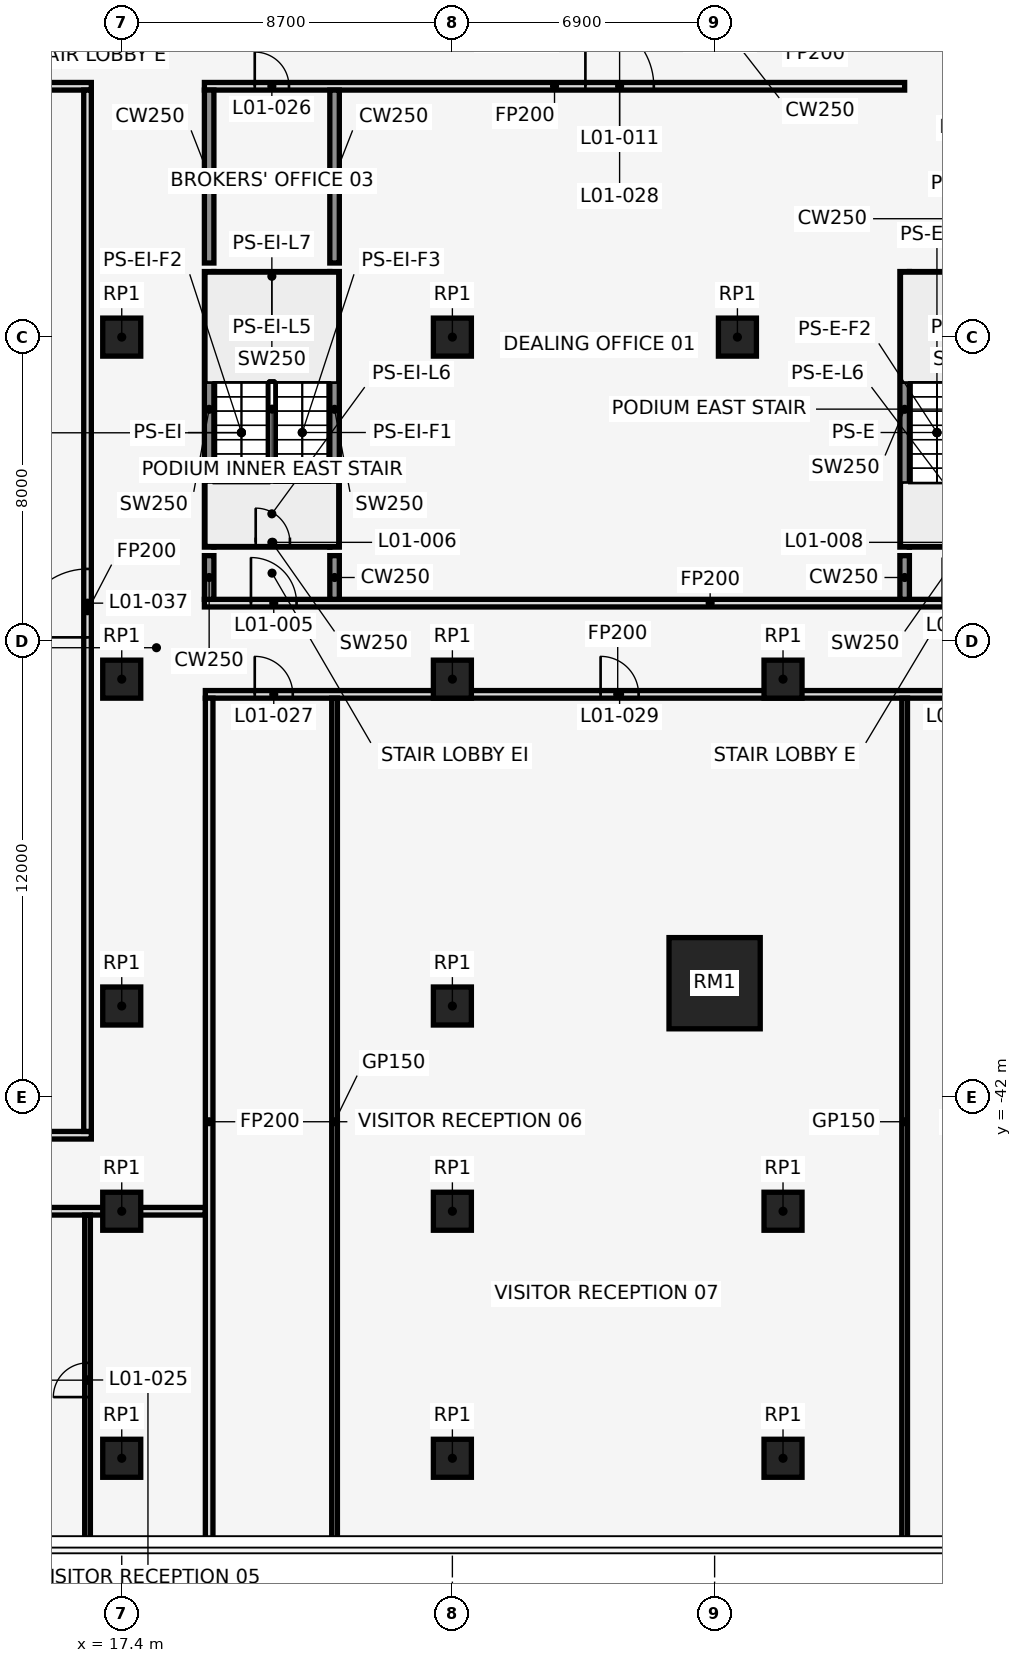
"""IFC4 building model, lengths in metres.
Left out: names, types, materials, properties, quantities, classifications, styles, units other than length and angle.
Written with IfcOpenShell. Run it as: python <this file> out.ifc"""

import sys

from ifc_helpers import new_model, si_unit, direction, frame, frame_2d, origin, origin_2d, place, context, subcontext, project, spatial, rectangle, extrude, element, fill, save


model = new_model("IFC4")
c1 = context("Model", 3, precision=1e-05, world=origin(), true_north=direction((0.0, 1.0)))
c2 = subcontext(c1, "Body", "Model", "MODEL_VIEW")
j1 = project(units=[si_unit("LENGTHUNIT", "METRE"), si_unit("PLANEANGLEUNIT", "RADIAN")], contexts=[c1])
p1 = place(None, origin())
s1 = spatial("IfcSite", under=j1, at=p1, CompositionType="ELEMENT")
p2 = place(p1, origin())
s2 = spatial("IfcBuilding", under=s1, at=p2, CompositionType="ELEMENT")
p3 = place(p2, frame((0.0, 0.0, 8.0)))
s3 = spatial("IfcBuildingStorey", under=s2, at=p3, CompositionType="ELEMENT", Elevation=8.0)
for number, where, z_axis, x_axis in (
    (1, (17.4, -39.6, 0.0), (0.0, 0.0, 1.0), (1.0, 0.0, 0.0)),
    (2, (26.1, -39.6, 0.0), (0.0, 0.0, 1.0), (1.0, 0.0, 0.0)),
):
    element("IfcColumn", number, at=place(p3, frame(where, z_axis=z_axis, x_axis=x_axis)), inside=s3, PredefinedType="COLUMN", context=c2, shape_type="SweptSolid", body=[
        extrude(rectangle(XDim=1.0, YDim=1.0, at=origin_2d()), origin(), (0.0, 0.0, 1.0), 6.0),
    ])
p4 = place(p3, frame((33.0, -39.0, 0.0), z_axis=(0.0, 0.0, 1.0), x_axis=(1.0, 0.0, 0.0)))
e3 = element("IfcColumn", 3, at=p4, inside=s3, PredefinedType="COLUMN", context=c2, shape_type="SweptSolid", body=[
    extrude(rectangle(XDim=2.4, YDim=2.4, at=origin_2d()), origin(), (0.0, 0.0, 1.0), 6.0),
])
for number, where, z_axis, x_axis in (
    (4, (33.6, -22.0, 0.0), (0.0, 0.0, 1.0), (1.0, 0.0, 0.0)),
    (5, (17.4, -22.0, 0.0), (0.0, 0.0, 1.0), (1.0, 0.0, 0.0)),
    (6, (26.1, -22.0, 0.0), (0.0, 0.0, 1.0), (1.0, 0.0, 0.0)),
    (7, (17.4, -31.0, 0.0), (0.0, 0.0, 1.0), (1.0, 0.0, 0.0)),
    (8, (17.4, -45.0, 0.0), (0.0, 0.0, 1.0), (1.0, 0.0, 0.0)),
    (9, (17.4, -51.5, 0.0), (0.0, 0.0, 1.0), (1.0, 0.0, 0.0)),
    (10, (26.1, -31.0, 0.0), (0.0, 0.0, 1.0), (1.0, 0.0, 0.0)),
    (11, (26.1, -45.0, 0.0), (0.0, 0.0, 1.0), (1.0, 0.0, 0.0)),
    (12, (26.1, -51.5, 0.0), (0.0, 0.0, 1.0), (1.0, 0.0, 0.0)),
    (13, (34.8, -31.0, 0.0), (0.0, 0.0, 1.0), (1.0, 0.0, 0.0)),
    (14, (34.8, -45.0, 0.0), (0.0, 0.0, 1.0), (1.0, 0.0, 0.0)),
    (15, (34.8, -51.5, 0.0), (0.0, 0.0, 1.0), (1.0, 0.0, 0.0)),
):
    element("IfcColumn", number, at=place(p3, frame(where, z_axis=z_axis, x_axis=x_axis)), inside=s3, PredefinedType="COLUMN", context=c2, shape_type="SweptSolid", body=[
        extrude(rectangle(XDim=1.0, YDim=1.0, at=origin_2d()), origin(), (0.0, 0.0, 1.0), 6.0),
    ])
for number, where, z_axis, x_axis in (
    (16, (19.7, -27.525, 0.0), (0.0, 0.0, 1.0), (0.0, 1.0, 0.0)),
    (17, (23.0, -27.525, 0.0), (0.0, 0.0, 1.0), (0.0, 1.0, 0.0)),
):
    element("IfcWall", number, at=place(p3, frame(where, z_axis=z_axis, x_axis=x_axis)), inside=s3, PredefinedType="SHEAR", context=c2, shape_type="SweptSolid", body=[
        extrude(rectangle(XDim=7.25, YDim=0.25, at=frame_2d((3.625, 0.0))), origin(), (0.0, 0.0, 1.0), 6.0),
    ])
p5 = place(p3, frame((19.825, -27.4, 0.0), z_axis=(0.0, 0.0, 1.0), x_axis=(1.0, 0.0, 0.0)))
e18 = element("IfcWall", 18, at=p5, inside=s3, PredefinedType="SHEAR", context=c2, shape_type="SweptSolid", body=[
    extrude(rectangle(XDim=3.05, YDim=0.25, at=frame_2d((1.525, 0.0))), origin(), (0.0, 0.0, 1.0), 6.0),
])
p6 = place(p5, frame((1.1, 0.0, 0.0)))
e19 = element("IfcOpeningElement", 19, at=p6, cuts=e18, PredefinedType="OPENING", context=c2, shape_type="SweptSolid", body=[
    extrude(rectangle(XDim=0.9, YDim=2.1, at=frame_2d((0.45, 1.05))), frame((0.0, 0.137, 0.0), z_axis=(0.0, -1.0, 0.0), x_axis=(1.0, 0.0, 0.0)), (0.0, 0.0, 1.0), 0.274),
])
p7 = place(p3, frame((19.825, -20.4, 0.0), z_axis=(0.0, 0.0, 1.0), x_axis=(1.0, 0.0, 0.0)))
e20 = element("IfcWall", 20, at=p7, inside=s3, PredefinedType="SHEAR", context=c2, shape_type="SweptSolid", body=[
    extrude(rectangle(XDim=3.05, YDim=0.25, at=frame_2d((1.525, 0.0))), origin(), (0.0, 0.0, 1.0), 6.0),
])
p8 = place(p3, frame((38.0, -27.525, 0.0), z_axis=(0.0, 0.0, 1.0), x_axis=(0.0, 1.0, 0.0)))
e21 = element("IfcWall", 21, at=p8, inside=s3, PredefinedType="SHEAR", context=c2, shape_type="SweptSolid", body=[
    extrude(rectangle(XDim=7.25, YDim=0.25, at=frame_2d((3.625, 0.0))), origin(), (0.0, 0.0, 1.0), 6.0),
])
p9 = place(p3, frame((38.125, -27.4, 0.0), z_axis=(0.0, 0.0, 1.0), x_axis=(1.0, 0.0, 0.0)))
e22 = element("IfcWall", 22, at=p9, inside=s3, PredefinedType="SHEAR", context=c2, shape_type="SweptSolid", body=[
    extrude(rectangle(XDim=3.05, YDim=0.25, at=frame_2d((1.525, 0.0))), origin(), (0.0, 0.0, 1.0), 6.0),
])
p10 = place(p9, frame((1.1, 0.0, 0.0)))
e23 = element("IfcOpeningElement", 23, at=p10, cuts=e22, PredefinedType="OPENING", context=c2, shape_type="SweptSolid", body=[
    extrude(rectangle(XDim=0.9, YDim=2.1, at=frame_2d((0.45, 1.05))), frame((0.0, 0.137, 0.0), z_axis=(0.0, -1.0, 0.0), x_axis=(1.0, 0.0, 0.0)), (0.0, 0.0, 1.0), 0.274),
])
p11 = place(p3, frame((38.125, -20.4, 0.0), z_axis=(0.0, 0.0, 1.0), x_axis=(1.0, 0.0, 0.0)))
e24 = element("IfcWall", 24, at=p11, inside=s3, PredefinedType="SHEAR", context=c2, shape_type="SweptSolid", body=[
    extrude(rectangle(XDim=3.05, YDim=0.25, at=frame_2d((1.525, 0.0))), origin(), (0.0, 0.0, 1.0), 6.0),
])
p12 = place(p3, frame((-16.5, -45.0, 0.0), z_axis=(0.0, 0.0, 1.0), x_axis=(1.0, 0.0, 0.0)))
e25 = element("IfcWall", 25, at=p12, inside=s3, PredefinedType="PARTITIONING", context=c2, shape_type="SweptSolid", body=[
    extrude(rectangle(XDim=36.1, YDim=0.2, at=frame_2d((18.05, 0.0))), origin(), (0.0, 0.0, 1.0), 5.7),
])
p13 = place(p12, frame((3.0, 0.0, 0.0)))
e26 = element("IfcOpeningElement", 26, at=p13, cuts=e25, PredefinedType="OPENING", context=c2, shape_type="SweptSolid", body=[
    extrude(rectangle(XDim=1.0, YDim=2.1, at=frame_2d((0.5, 1.05))), frame((0.0, 0.112, 0.0), z_axis=(0.0, -1.0, 0.0), x_axis=(1.0, 0.0, 0.0)), (0.0, 0.0, 1.0), 0.224),
])
p14 = place(p3, frame((-16.6, -43.0, 0.0), z_axis=(0.0, 0.0, 1.0), x_axis=(1.0, 0.0, 0.0)))
e27 = element("IfcWall", 27, at=p14, inside=s3, PredefinedType="PARTITIONING", context=c2, shape_type="SweptSolid", body=[
    extrude(rectangle(XDim=33.2, YDim=0.2, at=frame_2d((16.6, 0.0))), origin(), (0.0, 0.0, 1.0), 5.7),
])
p15 = place(p14, frame((16.5, 0.0, 0.0)))
e28 = element("IfcOpeningElement", 28, at=p15, cuts=e27, PredefinedType="OPENING", context=c2, shape_type="SweptSolid", body=[
    extrude(rectangle(XDim=1.8, YDim=2.1, at=frame_2d((0.9, 1.05))), frame((0.0, 0.112, 0.0), z_axis=(0.0, -1.0, 0.0), x_axis=(1.0, 0.0, 0.0)), (0.0, 0.0, 1.0), 0.224),
])
p16 = place(p3, frame((19.6, -31.4, 0.0), z_axis=(0.0, 0.0, 1.0), x_axis=(1.0, 0.0, 0.0)))
e29 = element("IfcWall", 29, at=p16, inside=s3, PredefinedType="PARTITIONING", context=c2, shape_type="SweptSolid", body=[
    extrude(rectangle(XDim=21.7, YDim=0.2, at=frame_2d((10.85, 0.0))), origin(), (0.0, 0.0, 1.0), 5.7),
])
p17 = place(p16, frame((1.3, 0.0, 0.0)))
e30 = element("IfcOpeningElement", 30, at=p17, cuts=e29, PredefinedType="OPENING", context=c2, shape_type="SweptSolid", body=[
    extrude(rectangle(XDim=1.0, YDim=2.1, at=frame_2d((0.5, 1.05))), frame((0.0, 0.112, 0.0), z_axis=(0.0, -1.0, 0.0), x_axis=(1.0, 0.0, 0.0)), (0.0, 0.0, 1.0), 0.224),
])
p18 = place(p16, frame((10.4, 0.0, 0.0)))
e31 = element("IfcOpeningElement", 31, at=p18, cuts=e29, PredefinedType="OPENING", context=c2, shape_type="SweptSolid", body=[
    extrude(rectangle(XDim=1.0, YDim=2.1, at=frame_2d((0.5, 1.05))), frame((0.0, 0.112, 0.0), z_axis=(0.0, -1.0, 0.0), x_axis=(1.0, 0.0, 0.0)), (0.0, 0.0, 1.0), 0.224),
])
p19 = place(p16, frame((19.5, 0.0, 0.0)))
e32 = element("IfcOpeningElement", 32, at=p19, cuts=e29, PredefinedType="OPENING", context=c2, shape_type="SweptSolid", body=[
    extrude(rectangle(XDim=1.0, YDim=2.1, at=frame_2d((0.5, 1.05))), frame((0.0, 0.112, 0.0), z_axis=(0.0, -1.0, 0.0), x_axis=(1.0, 0.0, 0.0)), (0.0, 0.0, 1.0), 0.224),
])
p20 = place(p3, frame((19.575, -29.0, 0.0), z_axis=(0.0, 0.0, 1.0), x_axis=(1.0, 0.0, 0.0)))
e33 = element("IfcWall", 33, at=p20, inside=s3, PredefinedType="PARTITIONING", context=c2, shape_type="SweptSolid", body=[
    extrude(rectangle(XDim=26.615, YDim=0.2, at=frame_2d((13.308, 0.0))), origin(), (0.0, 0.0, 1.0), 5.7),
])
p21 = place(p20, frame((1.225, 0.0, 0.0)))
e34 = element("IfcOpeningElement", 34, at=p21, cuts=e33, PredefinedType="OPENING", context=c2, shape_type="SweptSolid", body=[
    extrude(rectangle(XDim=1.2, YDim=2.1, at=frame_2d((0.6, 1.05))), frame((0.0, 0.112, 0.0), z_axis=(0.0, -1.0, 0.0), x_axis=(1.0, 0.0, 0.0)), (0.0, 0.0, 1.0), 0.224),
])
p22 = place(p20, frame((19.425, 0.0, 0.0)))
e35 = element("IfcOpeningElement", 35, at=p22, cuts=e33, PredefinedType="OPENING", context=c2, shape_type="SweptSolid", body=[
    extrude(rectangle(XDim=1.2, YDim=2.1, at=frame_2d((0.6, 1.05))), frame((0.0, 0.112, 0.0), z_axis=(0.0, -1.0, 0.0), x_axis=(1.0, 0.0, 0.0)), (0.0, 0.0, 1.0), 0.224),
])
p23 = place(p20, frame((23.725, 0.0, 0.0)))
e36 = element("IfcOpeningElement", 36, at=p23, cuts=e33, PredefinedType="OPENING", context=c2, shape_type="SweptSolid", body=[
    extrude(rectangle(XDim=0.9, YDim=2.1, at=frame_2d((0.45, 1.05))), frame((0.0, 0.112, 0.0), z_axis=(0.0, -1.0, 0.0), x_axis=(1.0, 0.0, 0.0)), (0.0, 0.0, 1.0), 0.224),
])
p24 = place(p3, frame((-16.6, -15.4, 0.0), z_axis=(0.0, 0.0, 1.0), x_axis=(1.0, 0.0, 0.0)))
e37 = element("IfcWall", 37, at=p24, inside=s3, PredefinedType="PARTITIONING", context=c2, shape_type="SweptSolid", body=[
    extrude(rectangle(XDim=33.2, YDim=0.2, at=frame_2d((16.6, 0.0))), origin(), (0.0, 0.0, 1.0), 5.7),
])
p25 = place(p24, frame((15.7, 0.0, 0.0)))
e38 = element("IfcOpeningElement", 38, at=p25, cuts=e37, PredefinedType="OPENING", context=c2, shape_type="SweptSolid", body=[
    extrude(rectangle(XDim=1.8, YDim=2.1, at=frame_2d((0.9, 1.05))), frame((0.0, 0.112, 0.0), z_axis=(0.0, -1.0, 0.0), x_axis=(1.0, 0.0, 0.0)), (0.0, 0.0, 1.0), 0.224),
])
p26 = place(p3, frame((19.575, -15.4, 0.0), z_axis=(0.0, 0.0, 1.0), x_axis=(1.0, 0.0, 0.0)))
e39 = element("IfcWall", 39, at=p26, inside=s3, PredefinedType="PARTITIONING", context=c2, shape_type="SweptSolid", body=[
    extrude(rectangle(XDim=18.425, YDim=0.2, at=frame_2d((9.212, 0.0))), origin(), (0.0, 0.0, 1.0), 5.7),
])
p27 = place(p26, frame((1.325, 0.0, 0.0)))
e40 = element("IfcOpeningElement", 40, at=p27, cuts=e39, PredefinedType="OPENING", context=c2, shape_type="SweptSolid", body=[
    extrude(rectangle(XDim=0.9, YDim=2.1, at=frame_2d((0.45, 1.05))), frame((0.0, 0.112, 0.0), z_axis=(0.0, -1.0, 0.0), x_axis=(1.0, 0.0, 0.0)), (0.0, 0.0, 1.0), 0.224),
])
p28 = place(p26, frame((10.025, 0.0, 0.0)))
e41 = element("IfcOpeningElement", 41, at=p28, cuts=e39, PredefinedType="OPENING", context=c2, shape_type="SweptSolid", body=[
    extrude(rectangle(XDim=1.8, YDim=2.1, at=frame_2d((0.9, 1.05))), frame((0.0, 0.112, 0.0), z_axis=(0.0, -1.0, 0.0), x_axis=(1.0, 0.0, 0.0)), (0.0, 0.0, 1.0), 0.224),
])
p29 = place(p3, frame((16.5, -53.79, 0.0), z_axis=(0.0, 0.0, 1.0), x_axis=(0.0, 1.0, 0.0)))
e42 = element("IfcWall", 42, at=p29, inside=s3, PredefinedType="PARTITIONING", context=c2, shape_type="SweptSolid", body=[
    extrude(rectangle(XDim=8.69, YDim=0.15, at=frame_2d((4.345, 0.0))), origin(), (0.0, 0.0, 1.0), 5.7),
])
p30 = place(p29, frame((3.9, 0.0, 0.0)))
e43 = element("IfcOpeningElement", 43, at=p30, cuts=e42, PredefinedType="OPENING", context=c2, shape_type="SweptSolid", body=[
    extrude(rectangle(XDim=0.9, YDim=2.1, at=frame_2d((0.45, 1.05))), frame((0.0, 0.087, 0.0), z_axis=(0.0, -1.0, 0.0), x_axis=(1.0, 0.0, 0.0)), (0.0, 0.0, 1.0), 0.174),
])
p31 = place(p3, frame((16.5, -42.9, 0.0), z_axis=(0.0, 0.0, 1.0), x_axis=(0.0, 1.0, 0.0)))
e44 = element("IfcWall", 44, at=p31, inside=s3, PredefinedType="PARTITIONING", context=c2, shape_type="SweptSolid", body=[
    extrude(rectangle(XDim=27.4, YDim=0.2, at=frame_2d((13.7, 0.0))), origin(), (0.0, 0.0, 1.0), 5.7),
])
p32 = place(p31, frame((13.0, 0.0, 0.0)))
e45 = element("IfcOpeningElement", 45, at=p32, cuts=e44, PredefinedType="OPENING", context=c2, shape_type="SweptSolid", body=[
    extrude(rectangle(XDim=1.8, YDim=2.1, at=frame_2d((0.9, 1.05))), frame((0.0, 0.112, 0.0), z_axis=(0.0, -1.0, 0.0), x_axis=(1.0, 0.0, 0.0)), (0.0, 0.0, 1.0), 0.224),
])
p33 = place(p3, frame((19.7, -53.79, 0.0), z_axis=(0.0, 0.0, 1.0), x_axis=(0.0, 1.0, 0.0)))
e46 = element("IfcWall", 46, at=p33, inside=s3, PredefinedType="PARTITIONING", context=c2, shape_type="SweptSolid", body=[
    extrude(rectangle(XDim=22.29, YDim=0.2, at=frame_2d((11.145, 0.0))), origin(), (0.0, 0.0, 1.0), 5.7),
])
p34 = place(p3, frame((19.7, -28.9, 0.0), z_axis=(0.0, 0.0, 1.0), x_axis=(0.0, 1.0, 0.0)))
e47 = element("IfcWall", 47, at=p34, inside=s3, PredefinedType="SHEAR", context=c2, shape_type="SweptSolid", body=[
    extrude(rectangle(XDim=1.15, YDim=0.25, at=frame_2d((0.575, 0.0))), origin(), (0.0, 0.0, 1.0), 6.0),
])
p35 = place(p3, frame((19.7, -20.05, 0.0), z_axis=(0.0, 0.0, 1.0), x_axis=(0.0, 1.0, 0.0)))
e48 = element("IfcWall", 48, at=p35, inside=s3, PredefinedType="SHEAR", context=c2, shape_type="SweptSolid", body=[
    extrude(rectangle(XDim=4.55, YDim=0.25, at=frame_2d((2.275, 0.0))), origin(), (0.0, 0.0, 1.0), 6.0),
])
p36 = place(p3, frame((23.0, -53.79, 0.0), z_axis=(0.0, 0.0, 1.0), x_axis=(0.0, 1.0, 0.0)))
e49 = element("IfcWall", 49, at=p36, inside=s3, PredefinedType="PARTITIONING", context=c2, shape_type="SweptSolid", body=[
    extrude(rectangle(XDim=22.29, YDim=0.15, at=frame_2d((11.145, 0.0))), origin(), (0.0, 0.0, 1.0), 5.7),
])
p37 = place(p3, frame((23.0, -28.9, 0.0), z_axis=(0.0, 0.0, 1.0), x_axis=(0.0, 1.0, 0.0)))
e50 = element("IfcWall", 50, at=p37, inside=s3, PredefinedType="SHEAR", context=c2, shape_type="SweptSolid", body=[
    extrude(rectangle(XDim=1.15, YDim=0.25, at=frame_2d((0.575, 0.0))), origin(), (0.0, 0.0, 1.0), 6.0),
])
p38 = place(p3, frame((23.0, -20.05, 0.0), z_axis=(0.0, 0.0, 1.0), x_axis=(0.0, 1.0, 0.0)))
e51 = element("IfcWall", 51, at=p38, inside=s3, PredefinedType="SHEAR", context=c2, shape_type="SweptSolid", body=[
    extrude(rectangle(XDim=4.55, YDim=0.25, at=frame_2d((2.275, 0.0))), origin(), (0.0, 0.0, 1.0), 6.0),
])
p39 = place(p3, frame((38.0, -53.79, 0.0), z_axis=(0.0, 0.0, 1.0), x_axis=(0.0, 1.0, 0.0)))
e52 = element("IfcWall", 52, at=p39, inside=s3, PredefinedType="PARTITIONING", context=c2, shape_type="SweptSolid", body=[
    extrude(rectangle(XDim=22.29, YDim=0.15, at=frame_2d((11.145, 0.0))), origin(), (0.0, 0.0, 1.0), 5.7),
])
p40 = place(p3, frame((38.0, -28.9, 0.0), z_axis=(0.0, 0.0, 1.0), x_axis=(0.0, 1.0, 0.0)))
e53 = element("IfcWall", 53, at=p40, inside=s3, PredefinedType="SHEAR", context=c2, shape_type="SweptSolid", body=[
    extrude(rectangle(XDim=1.15, YDim=0.25, at=frame_2d((0.575, 0.0))), origin(), (0.0, 0.0, 1.0), 6.0),
])
p41 = place(p21, origin())
e54 = element("IfcDoor", 54, at=p41, inside=s3, OperationType="SINGLE_SWING_LEFT", PredefinedType="DOOR", context=c2, shape_type="SweptSolid", body=[
    extrude(rectangle(XDim=1.2, YDim=2.1, at=frame_2d((0.6, 1.05))), frame((0.0, 0.025, 0.0), z_axis=(0.0, -1.0, 0.0), x_axis=(1.0, 0.0, 0.0)), (0.0, 0.0, 1.0), 0.05),
])
fill(e34, e54)
p42 = place(p6, origin())
e55 = element("IfcDoor", 55, at=p42, inside=s3, OperationType="SINGLE_SWING_RIGHT", PredefinedType="DOOR", context=c2, shape_type="SweptSolid", body=[
    extrude(rectangle(XDim=0.9, YDim=2.1, at=frame_2d((0.45, 1.05))), frame((0.0, 0.025, 0.0), z_axis=(0.0, -1.0, 0.0), x_axis=(1.0, 0.0, 0.0)), (0.0, 0.0, 1.0), 0.05),
])
fill(e19, e55)
p43 = place(p30, frame((0.9, 0.0, 0.0), z_axis=(0.0, 0.0, 1.0), x_axis=(-1.0, 0.0, 0.0)))
e56 = element("IfcDoor", 56, at=p43, inside=s3, OperationType="SINGLE_SWING_LEFT", PredefinedType="DOOR", context=c2, shape_type="SweptSolid", body=[
    extrude(rectangle(XDim=0.9, YDim=2.1, at=frame_2d((0.45, 1.05))), frame((0.0, 0.025, 0.0), z_axis=(0.0, -1.0, 0.0), x_axis=(1.0, 0.0, 0.0)), (0.0, 0.0, 1.0), 0.05),
])
fill(e43, e56)
p44 = place(p27, frame((0.9, 0.0, 0.0), z_axis=(0.0, 0.0, 1.0), x_axis=(-1.0, 0.0, 0.0)))
e57 = element("IfcDoor", 57, at=p44, inside=s3, OperationType="SINGLE_SWING_RIGHT", PredefinedType="DOOR", context=c2, shape_type="SweptSolid", body=[
    extrude(rectangle(XDim=0.9, YDim=2.1, at=frame_2d((0.45, 1.05))), frame((0.0, 0.025, 0.0), z_axis=(0.0, -1.0, 0.0), x_axis=(1.0, 0.0, 0.0)), (0.0, 0.0, 1.0), 0.05),
])
fill(e40, e57)
p45 = place(p17, frame((1.0, 0.0, 0.0), z_axis=(0.0, 0.0, 1.0), x_axis=(-1.0, 0.0, 0.0)))
e58 = element("IfcDoor", 58, at=p45, inside=s3, OperationType="SINGLE_SWING_RIGHT", PredefinedType="DOOR", context=c2, shape_type="SweptSolid", body=[
    extrude(rectangle(XDim=1.0, YDim=2.1, at=frame_2d((0.5, 1.05))), frame((0.0, 0.025, 0.0), z_axis=(0.0, -1.0, 0.0), x_axis=(1.0, 0.0, 0.0)), (0.0, 0.0, 1.0), 0.05),
])
fill(e30, e58)
p46 = place(p28, origin())
e59 = element("IfcDoor", 59, at=p46, inside=s3, OperationType="SINGLE_SWING_LEFT", PredefinedType="DOOR", context=c2, shape_type="SweptSolid", body=[
    extrude(rectangle(XDim=1.8, YDim=2.1, at=frame_2d((0.9, 1.05))), frame((0.0, 0.025, 0.0), z_axis=(0.0, -1.0, 0.0), x_axis=(1.0, 0.0, 0.0)), (0.0, 0.0, 1.0), 0.05),
])
fill(e41, e59)
p47 = place(p18, frame((1.0, 0.0, 0.0), z_axis=(0.0, 0.0, 1.0), x_axis=(-1.0, 0.0, 0.0)))
e60 = element("IfcDoor", 60, at=p47, inside=s3, OperationType="SINGLE_SWING_RIGHT", PredefinedType="DOOR", context=c2, shape_type="SweptSolid", body=[
    extrude(rectangle(XDim=1.0, YDim=2.1, at=frame_2d((0.5, 1.05))), frame((0.0, 0.025, 0.0), z_axis=(0.0, -1.0, 0.0), x_axis=(1.0, 0.0, 0.0)), (0.0, 0.0, 1.0), 0.05),
])
fill(e31, e60)
p48 = place(p32, origin())
e61 = element("IfcDoor", 61, at=p48, inside=s3, OperationType="SINGLE_SWING_LEFT", PredefinedType="DOOR", context=c2, shape_type="SweptSolid", body=[
    extrude(rectangle(XDim=1.8, YDim=2.1, at=frame_2d((0.9, 1.05))), frame((0.0, 0.025, 0.0), z_axis=(0.0, -1.0, 0.0), x_axis=(1.0, 0.0, 0.0)), (0.0, 0.0, 1.0), 0.05),
])
fill(e45, e61)
save(model, sys.argv[1])
